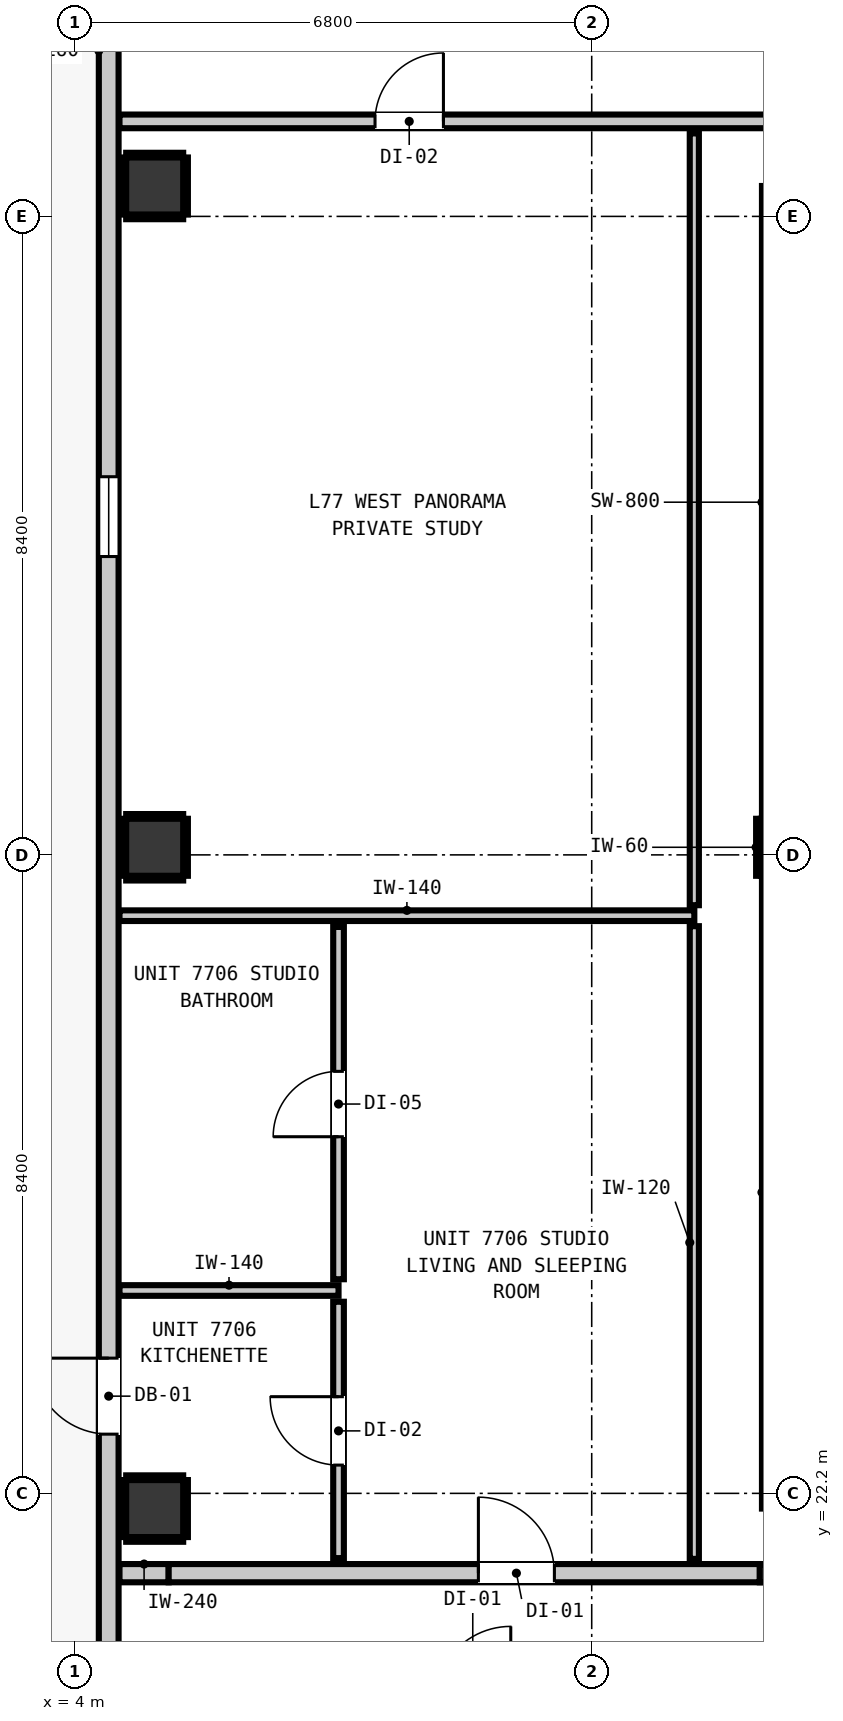
"""IFC4 building model, lengths in metres.
Left out: names, types, materials, properties, quantities, classifications, styles, units other than length and angle.
Written with IfcOpenShell. Run it as: python <this file> out.ifc"""

import sys

from ifc_helpers import new_model, si_unit, direction, frame, frame_2d, origin, origin_2d, place, context, subcontext, project, spatial, rectangle, extrude, element, fill, save


model = new_model("IFC4")
c1 = context("Model", 3, precision=1e-05, world=origin(), true_north=direction((0.0, 1.0)))
c2 = subcontext(c1, "Body", "Model", "MODEL_VIEW")
j1 = project(units=[si_unit("LENGTHUNIT", "METRE"), si_unit("PLANEANGLEUNIT", "RADIAN")], contexts=[c1])
p1 = place(None, origin())
s1 = spatial("IfcSite", under=j1, at=p1, CompositionType="ELEMENT")
p2 = place(p1, origin())
s2 = spatial("IfcBuilding", under=s1, at=p2, CompositionType="ELEMENT")
p3 = place(p2, frame((0.0, 0.0, 265.56)))
s3 = spatial("IfcBuildingStorey", under=s2, at=p3, CompositionType="ELEMENT", Elevation=265.56)
p4 = place(p3, frame((13.4, 30.7, 0.0), z_axis=(0.0, 0.0, 1.0), x_axis=(1.0, 0.0, 0.0)))
e1 = element("IfcColumn", 1, at=p4, inside=s3, PredefinedType="COLUMN", context=c2, shape_type="SweptSolid", body=[
    extrude(rectangle(XDim=0.75, YDim=0.75, at=origin_2d()), origin(), (0.0, 0.0, 1.0), 3.32),
])
p5 = place(p3, frame((13.44, 22.0, 0.0), z_axis=(0.0, 0.0, 1.0), x_axis=(0.0, 1.0, 0.0)))
e2 = element("IfcWall", 2, at=p5, inside=s3, PredefinedType="SHEAR", context=c2, shape_type="SweptSolid", body=[
    extrude(rectangle(XDim=8.32, YDim=0.8, at=frame_2d((4.16, 0.0))), origin(), (0.0, 0.0, 1.0), 3.32),
])
p6 = place(p3, frame((13.44, 31.08, 0.0), z_axis=(0.0, 0.0, 1.0), x_axis=(0.0, 1.0, 0.0)))
e3 = element("IfcWall", 3, at=p6, inside=s3, PredefinedType="SHEAR", context=c2, shape_type="SweptSolid", body=[
    extrude(rectangle(XDim=8.32, YDim=0.8, at=frame_2d((4.16, 0.0))), origin(), (0.0, 0.0, 1.0), 3.32),
])
for number, where, z_axis, x_axis in (
    (4, (5.05, 22.0, 0.0), (0.0, 0.0, 1.0), (1.0, 0.0, 0.0)),
    (5, (5.05, 30.7, 0.0), (0.0, 0.0, 1.0), (1.0, 0.0, 0.0)),
    (6, (5.05, 39.4, 0.0), (0.0, 0.0, 1.0), (1.0, 0.0, 0.0)),
):
    element("IfcColumn", number, at=place(p3, frame(where, z_axis=z_axis, x_axis=x_axis)), inside=s3, PredefinedType="COLUMN", context=c2, shape_type="SweptSolid", body=[
        extrude(rectangle(XDim=0.75, YDim=0.75, at=origin_2d()), origin(), (0.0, 0.0, 1.0), 3.32),
    ])
p7 = place(p3, frame((4.445, 18.545, 0.0), z_axis=(0.0, 0.0, 1.0), x_axis=(0.0, 1.0, 0.0)))
e7 = element("IfcWall", 7, at=p7, inside=s3, PredefinedType="STANDARD", context=c2, shape_type="SweptSolid", body=[
    extrude(rectangle(XDim=30.31, YDim=0.26, at=frame_2d((15.155, 0.0))), origin(), (0.0, 0.0, 1.0), 3.1),
])
p8 = place(p7, frame((4.434, 0.0, 0.0)))
e8 = element("IfcOpeningElement", 8, at=p8, cuts=e7, PredefinedType="OPENING", context=c2, shape_type="SweptSolid", body=[
    extrude(rectangle(XDim=1.0, YDim=2.15, at=frame_2d((0.5, 1.075))), frame((0.0, 0.14, 0.0), z_axis=(0.0, -1.0, 0.0), x_axis=(1.0, 0.0, 0.0)), (0.0, 0.0, 1.0), 0.28),
])
p9 = place(p7, frame((28.241, 0.0, 0.85)))
e9 = element("IfcOpeningElement", 9, at=p9, cuts=e7, PredefinedType="OPENING", context=c2, shape_type="SweptSolid", body=[
    extrude(rectangle(XDim=1.05, YDim=1.65, at=frame_2d((0.525, 0.825))), frame((0.0, 0.14, 0.0), z_axis=(0.0, -1.0, 0.0), x_axis=(1.0, 0.0, 0.0)), (0.0, 0.0, 1.0), 0.28),
])
p10 = place(p7, frame((15.98, 0.0, 0.85)))
e10 = element("IfcOpeningElement", 10, at=p10, cuts=e7, PredefinedType="OPENING", context=c2, shape_type="SweptSolid", body=[
    extrude(rectangle(XDim=1.05, YDim=1.65, at=frame_2d((0.525, 0.825))), frame((0.0, 0.14, 0.0), z_axis=(0.0, -1.0, 0.0), x_axis=(1.0, 0.0, 0.0)), (0.0, 0.0, 1.0), 0.28),
])
p11 = place(p3, frame((4.587, 21.15, 0.0), z_axis=(0.0, 0.0, 1.0), x_axis=(1.0, 0.0, 0.0)))
e11 = element("IfcWall", 11, at=p11, inside=s3, PredefinedType="PARTITIONING", context=c2, shape_type="SweptSolid", body=[
    extrude(rectangle(XDim=0.647, YDim=0.24, at=frame_2d((0.323, 0.0))), origin(), (0.0, 0.0, 1.0), 3.1),
])
p12 = place(p3, frame((5.234, 21.15, 0.0), z_axis=(0.0, 0.0, 1.0), x_axis=(1.0, 0.0, 0.0)))
e12 = element("IfcWall", 12, at=p12, inside=s3, PredefinedType="PARTITIONING", context=c2, shape_type="SweptSolid", body=[
    extrude(rectangle(XDim=7.778, YDim=0.24, at=frame_2d((3.889, 0.0))), origin(), (0.0, 0.0, 1.0), 2.477),
])
p13 = place(p12, frame((4.075, 0.0, 0.0)))
e13 = element("IfcOpeningElement", 13, at=p13, cuts=e12, PredefinedType="OPENING", context=c2, shape_type="SweptSolid", body=[
    extrude(rectangle(XDim=1.0, YDim=2.15, at=frame_2d((0.5, 1.075))), frame((0.0, 0.13, 0.0), z_axis=(0.0, -1.0, 0.0), x_axis=(1.0, 0.0, 0.0)), (0.0, 0.0, 1.0), 0.26),
])
p14 = place(p3, frame((13.012, 21.15, 0.0), z_axis=(0.0, 0.0, 1.0), x_axis=(1.0, 0.0, 0.0)))
e14 = element("IfcWall", 14, at=p14, inside=s3, PredefinedType="PARTITIONING", context=c2, shape_type="SweptSolid", body=[
    extrude(rectangle(XDim=28.201, YDim=0.24, at=frame_2d((14.101, 0.0))), origin(), (0.0, 0.0, 1.0), 3.1),
])
p15 = place(p14, frame((5.198, 0.0, 0.0)))
e15 = element("IfcOpeningElement", 15, at=p15, cuts=e14, PredefinedType="OPENING", context=c2, shape_type="SweptSolid", body=[
    extrude(rectangle(XDim=1.1, YDim=2.15, at=frame_2d((0.55, 1.075))), frame((0.0, 0.13, 0.0), z_axis=(0.0, -1.0, 0.0), x_axis=(1.0, 0.0, 0.0)), (0.0, 0.0, 1.0), 0.26),
])
p16 = place(p3, frame((4.587, 40.25, 0.0), z_axis=(0.0, 0.0, 1.0), x_axis=(1.0, 0.0, 0.0)))
e16 = element("IfcWall", 16, at=p16, inside=s3, PredefinedType="PARTITIONING", context=c2, shape_type="SweptSolid", body=[
    extrude(rectangle(XDim=36.626, YDim=0.18, at=frame_2d((18.313, 0.0))), origin(), (0.0, 0.0, 1.0), 3.1),
])
p17 = place(p16, frame((12.848, 0.0, 0.0)))
e17 = element("IfcOpeningElement", 17, at=p17, cuts=e16, PredefinedType="OPENING", context=c2, shape_type="SweptSolid", body=[
    extrude(rectangle(XDim=1.4, YDim=2.15, at=frame_2d((0.7, 1.075))), frame((0.0, 0.1, 0.0), z_axis=(0.0, -1.0, 0.0), x_axis=(1.0, 0.0, 0.0)), (0.0, 0.0, 1.0), 0.2),
])
p18 = place(p16, frame((3.362, 0.0, 0.0)))
e18 = element("IfcOpeningElement", 18, at=p18, cuts=e16, PredefinedType="OPENING", context=c2, shape_type="SweptSolid", body=[
    extrude(rectangle(XDim=0.9, YDim=2.1, at=frame_2d((0.45, 1.05))), frame((0.0, 0.1, 0.0), z_axis=(0.0, -1.0, 0.0), x_axis=(1.0, 0.0, 0.0)), (0.0, 0.0, 1.0), 0.2),
])
p19 = place(p3, frame((4.587, 24.869, 0.0), z_axis=(0.0, 0.0, 1.0), x_axis=(1.0, 0.0, 0.0)))
e19 = element("IfcWall", 19, at=p19, inside=s3, PredefinedType="PARTITIONING", context=c2, shape_type="SweptSolid", body=[
    extrude(rectangle(XDim=2.882, YDim=0.14, at=frame_2d((1.441, 0.0))), origin(), (0.0, 0.0, 1.0), 3.1),
])
p20 = place(p3, frame((4.587, 29.8, 0.0), z_axis=(0.0, 0.0, 1.0), x_axis=(1.0, 0.0, 0.0)))
e20 = element("IfcWall", 20, at=p20, inside=s3, PredefinedType="PARTITIONING", context=c2, shape_type="SweptSolid", body=[
    extrude(rectangle(XDim=7.563, YDim=0.14, at=frame_2d((3.781, 0.0))), origin(), (0.0, 0.0, 1.0), 3.1),
])
p21 = place(p3, frame((7.469, 21.348, 0.0), z_axis=(0.0, 0.0, 1.0), x_axis=(0.0, 1.0, 0.0)))
e21 = element("IfcWall", 21, at=p21, inside=s3, PredefinedType="PARTITIONING", context=c2, shape_type="SweptSolid", body=[
    extrude(rectangle(XDim=3.373, YDim=0.14, at=frame_2d((1.687, 0.0))), origin(), (0.0, 0.0, 1.0), 3.1),
])
p22 = place(p21, frame((1.224, 0.0, 0.0)))
e22 = element("IfcOpeningElement", 22, at=p22, cuts=e21, PredefinedType="OPENING", context=c2, shape_type="SweptSolid", body=[
    extrude(rectangle(XDim=0.9, YDim=2.1, at=frame_2d((0.45, 1.05))), frame((0.0, 0.08, 0.0), z_axis=(0.0, -1.0, 0.0), x_axis=(1.0, 0.0, 0.0)), (0.0, 0.0, 1.0), 0.16),
])
p23 = place(p3, frame((7.469, 25.017, 0.0), z_axis=(0.0, 0.0, 1.0), x_axis=(0.0, 1.0, 0.0)))
e23 = element("IfcWall", 23, at=p23, inside=s3, PredefinedType="PARTITIONING", context=c2, shape_type="SweptSolid", body=[
    extrude(rectangle(XDim=4.635, YDim=0.14, at=frame_2d((2.317, 0.0))), origin(), (0.0, 0.0, 1.0), 3.1),
])
p24 = place(p23, frame((1.875, 0.0, 0.0)))
e24 = element("IfcOpeningElement", 24, at=p24, cuts=e23, PredefinedType="OPENING", context=c2, shape_type="SweptSolid", body=[
    extrude(rectangle(XDim=0.86, YDim=2.02, at=frame_2d((0.43, 1.01))), frame((0.0, 0.08, 0.0), z_axis=(0.0, -1.0, 0.0), x_axis=(1.0, 0.0, 0.0)), (0.0, 0.0, 1.0), 0.16),
])
p25 = place(p3, frame((12.15, 21.338, 0.0), z_axis=(0.0, 0.0, 1.0), x_axis=(0.0, 1.0, 0.0)))
e25 = element("IfcWall", 25, at=p25, inside=s3, PredefinedType="PARTITIONING", context=c2, shape_type="SweptSolid", body=[
    extrude(rectangle(XDim=8.324, YDim=0.12, at=frame_2d((4.162, 0.0))), origin(), (0.0, 0.0, 1.0), 3.1),
])
p26 = place(p3, frame((12.15, 29.938, 0.0), z_axis=(0.0, 0.0, 1.0), x_axis=(0.0, 1.0, 0.0)))
e26 = element("IfcWall", 26, at=p26, inside=s3, PredefinedType="PARTITIONING", context=c2, shape_type="SweptSolid", body=[
    extrude(rectangle(XDim=10.154, YDim=0.12, at=frame_2d((5.077, 0.0))), origin(), (0.0, 0.0, 1.0), 3.1),
])
for number, where, z_axis, x_axis in (
    (27, (12.993, 30.325, 0.0), (0.0, 0.0, 1.0), (0.0, 1.0, 0.0)),
    (28, (4.675, 21.593, 0.0), (0.0, 0.0, 1.0), (1.0, 0.0, 0.0)),
    (29, (4.675, 22.407, 0.0), (0.0, 0.0, 1.0), (1.0, 0.0, 0.0)),
    (30, (4.643, 21.625, 0.0), (0.0, 0.0, 1.0), (0.0, 1.0, 0.0)),
    (31, (5.457, 21.625, 0.0), (0.0, 0.0, 1.0), (0.0, 1.0, 0.0)),
    (32, (4.675, 30.293, 0.0), (0.0, 0.0, 1.0), (1.0, 0.0, 0.0)),
    (33, (4.675, 31.107, 0.0), (0.0, 0.0, 1.0), (1.0, 0.0, 0.0)),
    (34, (4.643, 30.325, 0.0), (0.0, 0.0, 1.0), (0.0, 1.0, 0.0)),
    (35, (5.457, 30.325, 0.0), (0.0, 0.0, 1.0), (0.0, 1.0, 0.0)),
    (36, (4.675, 38.993, 0.0), (0.0, 0.0, 1.0), (1.0, 0.0, 0.0)),
    (37, (4.675, 39.807, 0.0), (0.0, 0.0, 1.0), (1.0, 0.0, 0.0)),
    (38, (4.643, 39.025, 0.0), (0.0, 0.0, 1.0), (0.0, 1.0, 0.0)),
    (39, (5.457, 39.025, 0.0), (0.0, 0.0, 1.0), (0.0, 1.0, 0.0)),
):
    element("IfcWall", number, at=place(p3, frame(where, z_axis=z_axis, x_axis=x_axis)), inside=s3, PredefinedType="PARTITIONING", context=c2, shape_type="SweptSolid", body=[
        extrude(rectangle(XDim=0.75, YDim=0.06, at=frame_2d((0.375, 0.0))), origin(), (0.0, 0.0, 1.0), 1.45),
    ])
p27 = place(p8, origin())
e40 = element("IfcDoor", 40, at=p27, inside=s3, OperationType="SINGLE_SWING_RIGHT", PredefinedType="DOOR", context=c2, shape_type="SweptSolid", body=[
    extrude(rectangle(XDim=1.0, YDim=2.15, at=frame_2d((0.5, 1.075))), frame((0.0, 0.025, 0.0), z_axis=(0.0, -1.0, 0.0), x_axis=(1.0, 0.0, 0.0)), (0.0, 0.0, 1.0), 0.05),
])
fill(e8, e40)
p28 = place(p10, origin())
e41 = element("IfcWindow", 41, at=p28, inside=s3, PartitioningType="SINGLE_PANEL", PredefinedType="WINDOW", context=c2, shape_type="SweptSolid", body=[
    extrude(rectangle(XDim=1.05, YDim=1.65, at=frame_2d((0.525, 0.825))), frame((0.0, 0.03, 0.0), z_axis=(0.0, -1.0, 0.0), x_axis=(1.0, 0.0, 0.0)), (0.0, 0.0, 1.0), 0.06),
])
fill(e10, e41)
p29 = place(p13, origin())
e42 = element("IfcDoor", 42, at=p29, inside=s3, OperationType="SINGLE_SWING_LEFT", PredefinedType="DOOR", context=c2, shape_type="SweptSolid", body=[
    extrude(rectangle(XDim=1.0, YDim=2.15, at=frame_2d((0.5, 1.075))), frame((0.0, 0.025, 0.0), z_axis=(0.0, -1.0, 0.0), x_axis=(1.0, 0.0, 0.0)), (0.0, 0.0, 1.0), 0.05),
])
fill(e13, e42)
p30 = place(p22, origin())
e43 = element("IfcDoor", 43, at=p30, inside=s3, OperationType="SINGLE_SWING_RIGHT", PredefinedType="DOOR", context=c2, shape_type="SweptSolid", body=[
    extrude(rectangle(XDim=0.9, YDim=2.1, at=frame_2d((0.45, 1.05))), frame((0.0, 0.025, 0.0), z_axis=(0.0, -1.0, 0.0), x_axis=(1.0, 0.0, 0.0)), (0.0, 0.0, 1.0), 0.05),
])
fill(e22, e43)
p31 = place(p24, origin())
e44 = element("IfcDoor", 44, at=p31, inside=s3, OperationType="SINGLE_SWING_LEFT", PredefinedType="DOOR", context=c2, shape_type="SweptSolid", body=[
    extrude(rectangle(XDim=0.86, YDim=2.02, at=frame_2d((0.43, 1.01))), frame((0.0, 0.025, 0.0), z_axis=(0.0, -1.0, 0.0), x_axis=(1.0, 0.0, 0.0)), (0.0, 0.0, 1.0), 0.05),
])
fill(e24, e44)
p32 = place(p18, origin())
e45 = element("IfcDoor", 45, at=p32, inside=s3, OperationType="SINGLE_SWING_RIGHT", PredefinedType="DOOR", context=c2, shape_type="SweptSolid", body=[
    extrude(rectangle(XDim=0.9, YDim=2.1, at=frame_2d((0.45, 1.05))), frame((0.0, 0.025, 0.0), z_axis=(0.0, -1.0, 0.0), x_axis=(1.0, 0.0, 0.0)), (0.0, 0.0, 1.0), 0.05),
])
fill(e18, e45)
save(model, sys.argv[1])
